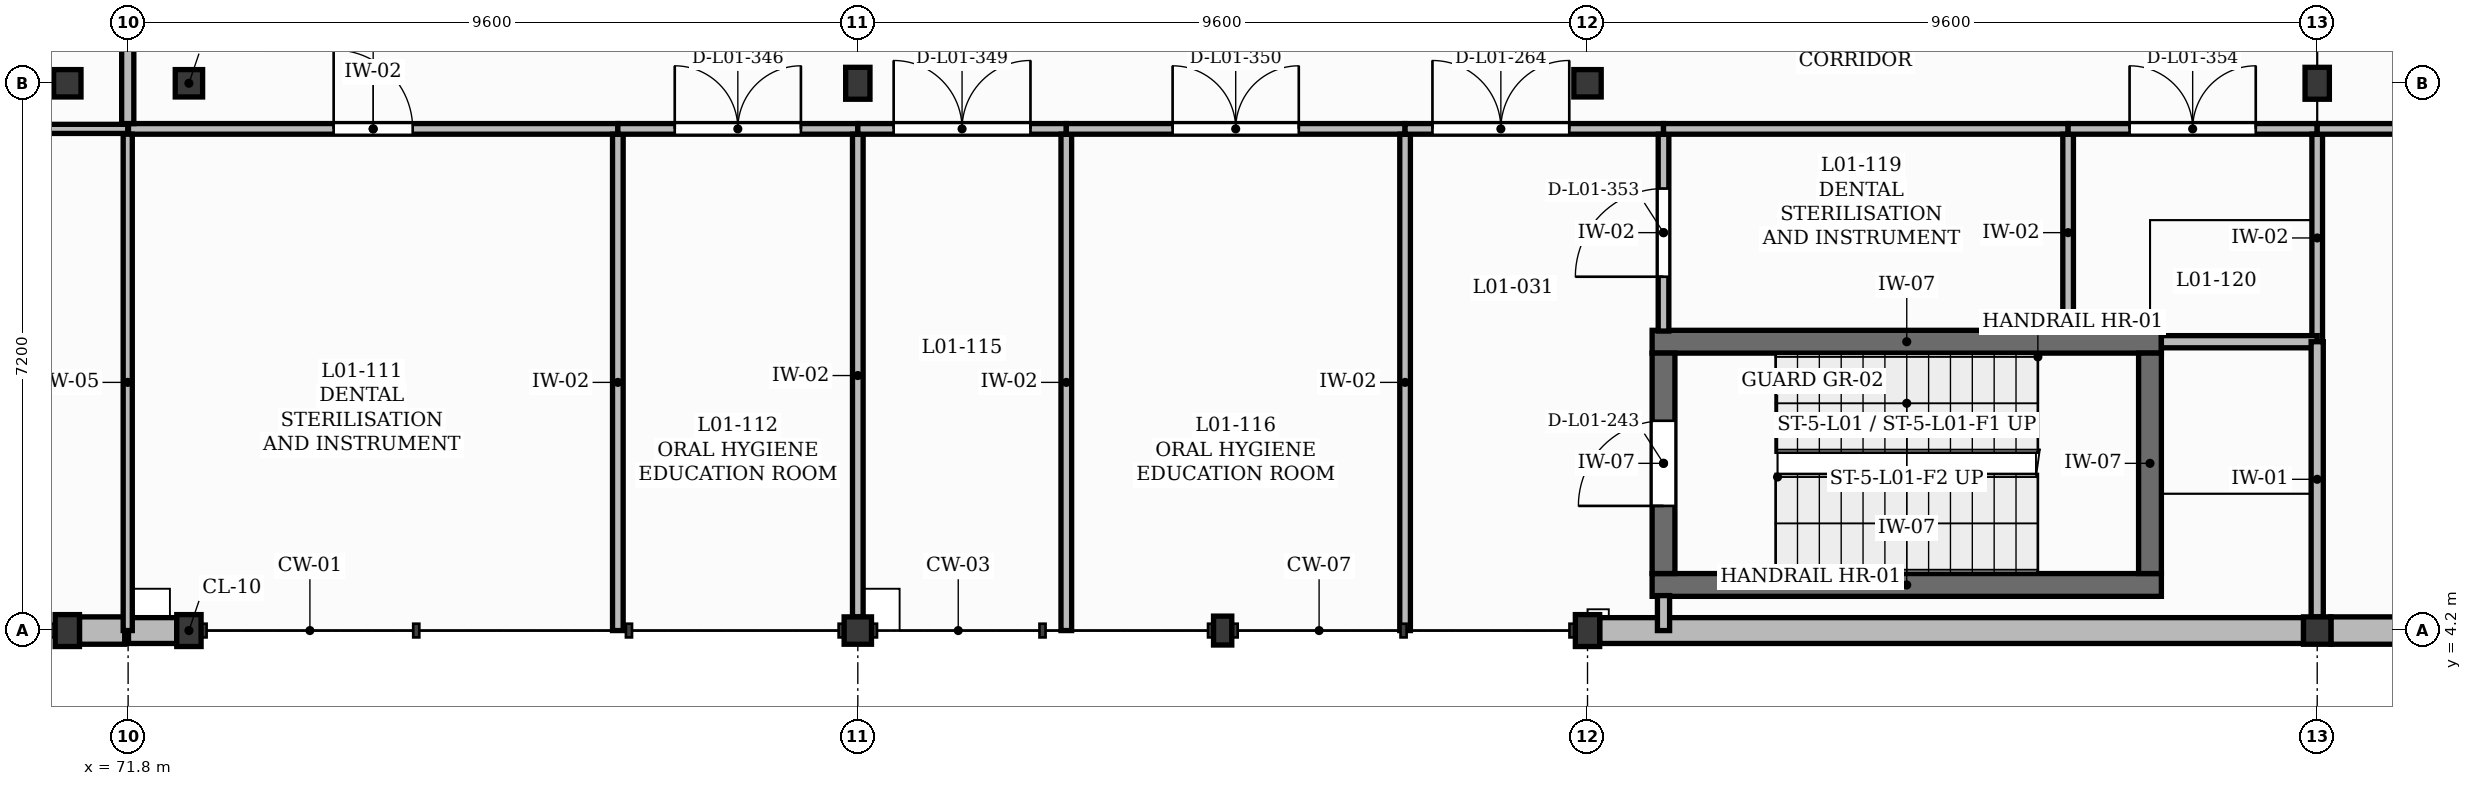
"""IFC4 building model, lengths in metres.
Left out: names, types, materials, properties, quantities, classifications, styles, units other than length and angle.
Written with IfcOpenShell. Run it as: python <this file> out.ifc"""

import sys

from ifc_helpers import new_model, si_unit, direction, frame, frame_2d, origin, origin_2d, place, context, subcontext, project, spatial, rectangle, extrude, element, fill, save


model = new_model("IFC4")
c1 = context("Model", 3, precision=1e-05, world=origin(), true_north=direction((0.0, 1.0)))
c2 = subcontext(c1, "Body", "Model", "MODEL_VIEW")
j1 = project(units=[si_unit("LENGTHUNIT", "METRE"), si_unit("PLANEANGLEUNIT", "RADIAN")], contexts=[c1])
p1 = place(None, origin())
s1 = spatial("IfcSite", under=j1, at=p1, CompositionType="ELEMENT")
p2 = place(p1, origin())
s2 = spatial("IfcBuilding", under=s1, at=p2, CompositionType="ELEMENT")
p3 = place(p2, frame((0.0, 0.0, 4.5)))
s3 = spatial("IfcBuildingStorey", under=s2, at=p3, CompositionType="ELEMENT", Elevation=4.5)
p4 = place(p3, frame((72.6, 4.2, 0.0), z_axis=(0.0, 0.0, 1.0), x_axis=(1.0, 0.0, 0.0)))
e1 = element("IfcColumn", 1, at=p4, inside=s3, PredefinedType="COLUMN", context=c2, shape_type="SweptSolid", body=[
    extrude(rectangle(XDim=0.32, YDim=0.42, at=origin_2d()), origin(), (0.0, 0.0, 1.0), 4.26),
])
for number, where, z_axis, x_axis in (
    (2, (72.6, 11.4, 0.0), (0.0, 0.0, 1.0), (1.0, 0.0, 0.0)),
    (3, (81.4, 4.2, 0.0), (0.0, 0.0, 1.0), (1.0, 0.0, 0.0)),
):
    element("IfcColumn", number, at=place(p3, frame(where, z_axis=z_axis, x_axis=x_axis)), inside=s3, PredefinedType="COLUMN", context=c2, shape_type="SweptSolid", body=[
        extrude(rectangle(XDim=0.36, YDim=0.36, at=origin_2d()), origin(), (0.0, 0.0, 1.0), 4.26),
    ])
for number, where, z_axis, x_axis in (
    (4, (81.4, 11.4, 0.0), (0.0, 0.0, 1.0), (1.0, 0.0, 0.0)),
    (5, (91.0, 4.2, 0.0), (0.0, 0.0, 1.0), (1.0, 0.0, 0.0)),
):
    element("IfcColumn", number, at=place(p3, frame(where, z_axis=z_axis, x_axis=x_axis)), inside=s3, PredefinedType="COLUMN", context=c2, shape_type="SweptSolid", body=[
        extrude(rectangle(XDim=0.32, YDim=0.42, at=origin_2d()), origin(), (0.0, 0.0, 1.0), 4.26),
    ])
for number, where, z_axis, x_axis in (
    (6, (91.0, 11.4, 0.0), (0.0, 0.0, 1.0), (1.0, 0.0, 0.0)),
    (7, (100.6, 4.2, 0.0), (0.0, 0.0, 1.0), (1.0, 0.0, 0.0)),
):
    element("IfcColumn", number, at=place(p3, frame(where, z_axis=z_axis, x_axis=x_axis)), inside=s3, PredefinedType="COLUMN", context=c2, shape_type="SweptSolid", body=[
        extrude(rectangle(XDim=0.36, YDim=0.36, at=origin_2d()), origin(), (0.0, 0.0, 1.0), 4.26),
    ])
for number, where, z_axis, x_axis in (
    (8, (100.6, 11.4, 0.0), (0.0, 0.0, 1.0), (1.0, 0.0, 0.0)),
    (9, (71.0, 4.2, 0.0), (0.0, 0.0, 1.0), (1.0, 0.0, 0.0)),
):
    element("IfcColumn", number, at=place(p3, frame(where, z_axis=z_axis, x_axis=x_axis)), inside=s3, PredefinedType="COLUMN", context=c2, shape_type="SweptSolid", body=[
        extrude(rectangle(XDim=0.32, YDim=0.42, at=origin_2d()), origin(), (0.0, 0.0, 1.0), 4.26),
    ])
p5 = place(p3, frame((71.0, 11.4, 0.0), z_axis=(0.0, 0.0, 1.0), x_axis=(1.0, 0.0, 0.0)))
e10 = element("IfcColumn", 10, at=p5, inside=s3, PredefinedType="COLUMN", context=c2, shape_type="SweptSolid", body=[
    extrude(rectangle(XDim=0.36, YDim=0.36, at=origin_2d()), origin(), (0.0, 0.0, 1.0), 4.26),
])
p6 = place(p3, frame((86.2, 4.2, 0.0), z_axis=(0.0, 0.0, 1.0), x_axis=(1.0, 0.0, 0.0)))
e11 = element("IfcColumn", 11, at=p6, inside=s3, PredefinedType="PILASTER", context=c2, shape_type="SweptSolid", body=[
    extrude(rectangle(XDim=0.24, YDim=0.38, at=origin_2d()), origin(), (0.0, 0.0, 1.0), 4.26),
])
p7 = place(p3, frame((71.16, 4.2, 0.0), z_axis=(0.0, 0.0, 1.0), x_axis=(1.0, 0.0, 0.0)))
e12 = element("IfcWall", 12, at=p7, inside=s3, PredefinedType="SOLIDWALL", context=c2, shape_type="SweptSolid", body=[
    extrude(rectangle(XDim=0.595, YDim=0.36, at=frame_2d((0.297, 0.0))), origin(), (0.0, 0.0, 1.0), 4.26),
])
p8 = place(p3, frame((71.805, 4.2, 0.0), z_axis=(0.0, 0.0, 1.0), x_axis=(1.0, 0.0, 0.0)))
e13 = element("IfcWall", 13, at=p8, inside=s3, PredefinedType="SOLIDWALL", context=c2, shape_type="SweptSolid", body=[
    extrude(rectangle(XDim=0.635, YDim=0.34, at=frame_2d((0.317, 0.0))), origin(), (0.0, 0.0, 1.0), 4.26),
])
p9 = place(p3, frame((91.16, 4.2, 0.0), z_axis=(0.0, 0.0, 1.0), x_axis=(1.0, 0.0, 0.0)))
e14 = element("IfcWall", 14, at=p9, inside=s3, PredefinedType="SOLIDWALL", context=c2, shape_type="SweptSolid", body=[
    extrude(rectangle(XDim=9.26, YDim=0.34, at=frame_2d((4.63, 0.0))), origin(), (0.0, 0.0, 1.0), 3.8),
])
p10 = place(p3, frame((100.78, 4.2, 0.0), z_axis=(0.0, 0.0, 1.0), x_axis=(1.0, 0.0, 0.0)))
e15 = element("IfcWall", 15, at=p10, inside=s3, PredefinedType="SOLIDWALL", context=c2, shape_type="SweptSolid", body=[
    extrude(rectangle(XDim=3.3, YDim=0.36, at=frame_2d((1.65, 0.0))), origin(), (0.0, 0.0, 1.0), 3.8),
])
p11 = place(p10, frame((0.99, 0.0, 1.5)))
e16 = element("IfcOpeningElement", 16, at=p11, cuts=e15, PredefinedType="OPENING", context=c2, shape_type="SweptSolid", body=[
    extrude(rectangle(XDim=1.32, YDim=1.25, at=frame_2d((0.66, 0.625))), frame((0.0, 0.19, 0.0), z_axis=(0.0, -1.0, 0.0), x_axis=(1.0, 0.0, 0.0)), (0.0, 0.0, 1.0), 0.38),
])
for number, where, z_axis, x_axis in (
    (17, (91.85, 4.8, 0.0), (0.0, 0.0, 1.0), (1.0, 0.0, 0.0)),
    (18, (91.85, 8.0, 0.0), (0.0, 0.0, 1.0), (1.0, 0.0, 0.0)),
):
    element("IfcWall", number, at=place(p3, frame(where, z_axis=z_axis, x_axis=x_axis)), inside=s3, PredefinedType="SHEAR", context=c2, shape_type="SweptSolid", body=[
        extrude(rectangle(XDim=6.7, YDim=0.3, at=frame_2d((3.35, 0.0))), origin(), (0.0, 0.0, 1.0), 4.25),
    ])
p12 = place(p3, frame((92.0, 4.95, 0.0), z_axis=(0.0, 0.0, 1.0), x_axis=(0.0, 1.0, 0.0)))
e19 = element("IfcWall", 19, at=p12, inside=s3, PredefinedType="SHEAR", context=c2, shape_type="SweptSolid", body=[
    extrude(rectangle(XDim=2.9, YDim=0.3, at=frame_2d((1.45, 0.0))), origin(), (0.0, 0.0, 1.0), 4.25),
])
p13 = place(p12, frame((0.89, 0.0, 0.0)))
e20 = element("IfcOpeningElement", 20, at=p13, cuts=e19, PredefinedType="OPENING", context=c2, shape_type="SweptSolid", body=[
    extrude(rectangle(XDim=1.12, YDim=2.1, at=frame_2d((0.56, 1.05))), frame((0.0, 0.16, 0.0), z_axis=(0.0, -1.0, 0.0), x_axis=(1.0, 0.0, 0.0)), (0.0, 0.0, 1.0), 0.32),
])
p14 = place(p3, frame((98.4, 4.95, 0.0), z_axis=(0.0, 0.0, 1.0), x_axis=(0.0, 1.0, 0.0)))
e21 = element("IfcWall", 21, at=p14, inside=s3, PredefinedType="SHEAR", context=c2, shape_type="SweptSolid", body=[
    extrude(rectangle(XDim=2.9, YDim=0.3, at=frame_2d((1.45, 0.0))), origin(), (0.0, 0.0, 1.0), 4.25),
])
p15 = place(p3, frame((65.8, 10.8, 0.0), z_axis=(0.0, 0.0, 1.0), x_axis=(1.0, 0.0, 0.0)))
e22 = element("IfcWall", 22, at=p15, inside=s3, PredefinedType="PLUMBINGWALL", context=c2, shape_type="SweptSolid", body=[
    extrude(rectangle(XDim=5.995, YDim=0.12, at=frame_2d((2.998, 0.0))), origin(), (0.0, 0.0, 1.0), 4.18),
])
p16 = place(p15, frame((2.522, 0.0, 0.0)))
e23 = element("IfcOpeningElement", 23, at=p16, cuts=e22, PredefinedType="OPENING", context=c2, shape_type="SweptSolid", body=[
    extrude(rectangle(XDim=0.95, YDim=2.1, at=frame_2d((0.475, 1.05))), frame((0.0, 0.07, 0.0), z_axis=(0.0, -1.0, 0.0), x_axis=(1.0, 0.0, 0.0)), (0.0, 0.0, 1.0), 0.14),
])
p17 = place(p3, frame((71.805, 10.8, 0.0), z_axis=(0.0, 0.0, 1.0), x_axis=(1.0, 0.0, 0.0)))
e24 = element("IfcWall", 24, at=p17, inside=s3, PredefinedType="PARTITIONING", context=c2, shape_type="SweptSolid", body=[
    extrude(rectangle(XDim=6.438, YDim=0.14, at=frame_2d((3.219, 0.0))), origin(), (0.0, 0.0, 1.0), 4.18),
])
p18 = place(p17, frame((2.699, 0.0, 0.0)))
e25 = element("IfcOpeningElement", 25, at=p18, cuts=e24, PredefinedType="OPENING", context=c2, shape_type="SweptSolid", body=[
    extrude(rectangle(XDim=1.04, YDim=2.1, at=frame_2d((0.52, 1.05))), frame((0.0, 0.08, 0.0), z_axis=(0.0, -1.0, 0.0), x_axis=(1.0, 0.0, 0.0)), (0.0, 0.0, 1.0), 0.16),
])
p19 = place(p3, frame((78.243, 4.2, 0.0), z_axis=(0.0, 0.0, 1.0), x_axis=(0.0, 1.0, 0.0)))
e26 = element("IfcWall", 26, at=p19, inside=s3, PredefinedType="PARTITIONING", context=c2, shape_type="SweptSolid", body=[
    extrude(rectangle(XDim=6.53, YDim=0.14, at=frame_2d((3.265, 0.0))), origin(), (0.0, 0.0, 1.0), 4.18),
])
p20 = place(p3, frame((78.243, 10.8, 0.0), z_axis=(0.0, 0.0, 1.0), x_axis=(1.0, 0.0, 0.0)))
e27 = element("IfcWall", 27, at=p20, inside=s3, PredefinedType="PARTITIONING", context=c2, shape_type="SweptSolid", body=[
    extrude(rectangle(XDim=3.157, YDim=0.14, at=frame_2d((1.579, 0.0))), origin(), (0.0, 0.0, 1.0), 4.18),
])
p21 = place(p20, frame((0.749, 0.0, 0.0)))
e28 = element("IfcOpeningElement", 28, at=p21, cuts=e27, PredefinedType="OPENING", context=c2, shape_type="SweptSolid", body=[
    extrude(rectangle(XDim=1.66, YDim=2.3, at=frame_2d((0.83, 1.15))), frame((0.0, 0.08, 0.0), z_axis=(0.0, -1.0, 0.0), x_axis=(1.0, 0.0, 0.0)), (0.0, 0.0, 1.0), 0.16),
])
p22 = place(p3, frame((81.4, 4.38, 0.0), z_axis=(0.0, 0.0, 1.0), x_axis=(0.0, 1.0, 0.0)))
e29 = element("IfcWall", 29, at=p22, inside=s3, PredefinedType="PARTITIONING", context=c2, shape_type="SweptSolid", body=[
    extrude(rectangle(XDim=6.35, YDim=0.14, at=frame_2d((3.175, 0.0))), origin(), (0.0, 0.0, 1.0), 3.74),
])
p23 = place(p3, frame((81.4, 10.8, 0.0), z_axis=(0.0, 0.0, 1.0), x_axis=(1.0, 0.0, 0.0)))
e30 = element("IfcWall", 30, at=p23, inside=s3, PredefinedType="PARTITIONING", context=c2, shape_type="SweptSolid", body=[
    extrude(rectangle(XDim=2.743, YDim=0.14, at=frame_2d((1.372, 0.0))), origin(), (0.0, 0.0, 1.0), 4.18),
])
p24 = place(p23, frame((0.471, 0.0, 0.0)))
e31 = element("IfcOpeningElement", 31, at=p24, cuts=e30, PredefinedType="OPENING", context=c2, shape_type="SweptSolid", body=[
    extrude(rectangle(XDim=1.8, YDim=2.3, at=frame_2d((0.9, 1.15))), frame((0.0, 0.08, 0.0), z_axis=(0.0, -1.0, 0.0), x_axis=(1.0, 0.0, 0.0)), (0.0, 0.0, 1.0), 0.16),
])
p25 = place(p3, frame((84.143, 4.2, 0.0), z_axis=(0.0, 0.0, 1.0), x_axis=(0.0, 1.0, 0.0)))
e32 = element("IfcWall", 32, at=p25, inside=s3, PredefinedType="PARTITIONING", context=c2, shape_type="SweptSolid", body=[
    extrude(rectangle(XDim=6.53, YDim=0.14, at=frame_2d((3.265, 0.0))), origin(), (0.0, 0.0, 1.0), 4.18),
])
p26 = place(p3, frame((84.143, 10.8, 0.0), z_axis=(0.0, 0.0, 1.0), x_axis=(1.0, 0.0, 0.0)))
e33 = element("IfcWall", 33, at=p26, inside=s3, PredefinedType="PARTITIONING", context=c2, shape_type="SweptSolid", body=[
    extrude(rectangle(XDim=4.457, YDim=0.14, at=frame_2d((2.229, 0.0))), origin(), (0.0, 0.0, 1.0), 4.18),
])
p27 = place(p26, frame((1.398, 0.0, 0.0)))
e34 = element("IfcOpeningElement", 34, at=p27, cuts=e33, PredefinedType="OPENING", context=c2, shape_type="SweptSolid", body=[
    extrude(rectangle(XDim=1.66, YDim=2.3, at=frame_2d((0.83, 1.15))), frame((0.0, 0.08, 0.0), z_axis=(0.0, -1.0, 0.0), x_axis=(1.0, 0.0, 0.0)), (0.0, 0.0, 1.0), 0.16),
])
p28 = place(p3, frame((88.6, 4.2, 0.0), z_axis=(0.0, 0.0, 1.0), x_axis=(0.0, 1.0, 0.0)))
e35 = element("IfcWall", 35, at=p28, inside=s3, PredefinedType="PARTITIONING", context=c2, shape_type="SweptSolid", body=[
    extrude(rectangle(XDim=6.53, YDim=0.14, at=frame_2d((3.265, 0.0))), origin(), (0.0, 0.0, 1.0), 3.9),
])
p29 = place(p3, frame((88.6, 10.8, 0.0), z_axis=(0.0, 0.0, 1.0), x_axis=(1.0, 0.0, 0.0)))
e36 = element("IfcWall", 36, at=p29, inside=s3, PredefinedType="PARTITIONING", context=c2, shape_type="SweptSolid", body=[
    extrude(rectangle(XDim=3.4, YDim=0.14, at=frame_2d((1.7, 0.0))), origin(), (0.0, 0.0, 1.0), 4.18),
])
p30 = place(p29, frame((0.36, 0.0, 0.0)))
e37 = element("IfcOpeningElement", 37, at=p30, cuts=e36, PredefinedType="OPENING", context=c2, shape_type="SweptSolid", body=[
    extrude(rectangle(XDim=1.8, YDim=2.3, at=frame_2d((0.9, 1.15))), frame((0.0, 0.08, 0.0), z_axis=(0.0, -1.0, 0.0), x_axis=(1.0, 0.0, 0.0)), (0.0, 0.0, 1.0), 0.16),
])
p31 = place(p3, frame((92.0, 8.14, 0.0), z_axis=(0.0, 0.0, 1.0), x_axis=(0.0, 1.0, 0.0)))
e38 = element("IfcWall", 38, at=p31, inside=s3, PredefinedType="PARTITIONING", context=c2, shape_type="SweptSolid", body=[
    extrude(rectangle(XDim=2.59, YDim=0.14, at=frame_2d((1.295, 0.0))), origin(), (0.0, 0.0, 1.0), 4.18),
])
p32 = place(p31, frame((0.715, 0.0, 0.0)))
e39 = element("IfcOpeningElement", 39, at=p32, cuts=e38, PredefinedType="OPENING", context=c2, shape_type="SweptSolid", body=[
    extrude(rectangle(XDim=1.16, YDim=2.1, at=frame_2d((0.58, 1.05))), frame((0.0, 0.08, 0.0), z_axis=(0.0, -1.0, 0.0), x_axis=(1.0, 0.0, 0.0)), (0.0, 0.0, 1.0), 0.16),
])
p33 = place(p3, frame((92.0, 10.8, 0.0), z_axis=(0.0, 0.0, 1.0), x_axis=(1.0, 0.0, 0.0)))
e40 = element("IfcWall", 40, at=p33, inside=s3, PredefinedType="PARTITIONING", context=c2, shape_type="SweptSolid", body=[
    extrude(rectangle(XDim=5.323, YDim=0.14, at=frame_2d((2.662, 0.0))), origin(), (0.0, 0.0, 1.0), 4.18),
])
p34 = place(p3, frame((97.323, 8.14, 0.0), z_axis=(0.0, 0.0, 1.0), x_axis=(0.0, 1.0, 0.0)))
e41 = element("IfcWall", 41, at=p34, inside=s3, PredefinedType="PARTITIONING", context=c2, shape_type="SweptSolid", body=[
    extrude(rectangle(XDim=2.59, YDim=0.14, at=frame_2d((1.295, 0.0))), origin(), (0.0, 0.0, 1.0), 4.18),
])
p35 = place(p3, frame((97.323, 10.8, 0.0), z_axis=(0.0, 0.0, 1.0), x_axis=(1.0, 0.0, 0.0)))
e42 = element("IfcWall", 42, at=p35, inside=s3, PredefinedType="PARTITIONING", context=c2, shape_type="SweptSolid", body=[
    extrude(rectangle(XDim=3.277, YDim=0.14, at=frame_2d((1.639, 0.0))), origin(), (0.0, 0.0, 1.0), 4.18),
])
p36 = place(p35, frame((0.809, 0.0, 0.0)))
e43 = element("IfcOpeningElement", 43, at=p36, cuts=e42, PredefinedType="OPENING", context=c2, shape_type="SweptSolid", body=[
    extrude(rectangle(XDim=1.66, YDim=2.3, at=frame_2d((0.83, 1.15))), frame((0.0, 0.08, 0.0), z_axis=(0.0, -1.0, 0.0), x_axis=(1.0, 0.0, 0.0)), (0.0, 0.0, 1.0), 0.16),
])
p37 = place(p3, frame((100.6, 8.0, 0.0), z_axis=(0.0, 0.0, 1.0), x_axis=(0.0, 1.0, 0.0)))
e44 = element("IfcWall", 44, at=p37, inside=s3, PredefinedType="PARTITIONING", context=c2, shape_type="SweptSolid", body=[
    extrude(rectangle(XDim=2.73, YDim=0.14, at=frame_2d((1.365, 0.0))), origin(), (0.0, 0.0, 1.0), 3.74),
])
p38 = place(p3, frame((100.6, 10.8, 0.0), z_axis=(0.0, 0.0, 1.0), x_axis=(1.0, 0.0, 0.0)))
e45 = element("IfcWall", 45, at=p38, inside=s3, PredefinedType="PARTITIONING", context=c2, shape_type="SweptSolid", body=[
    extrude(rectangle(XDim=7.2, YDim=0.14, at=frame_2d((3.6, 0.0))), origin(), (0.0, 0.0, 1.0), 4.18),
])
p39 = place(p38, frame((3.14, 0.0, 0.0)))
e46 = element("IfcOpeningElement", 46, at=p39, cuts=e45, PredefinedType="OPENING", context=c2, shape_type="SweptSolid", body=[
    extrude(rectangle(XDim=0.92, YDim=2.1, at=frame_2d((0.46, 1.05))), frame((0.0, 0.08, 0.0), z_axis=(0.0, -1.0, 0.0), x_axis=(1.0, 0.0, 0.0)), (0.0, 0.0, 1.0), 0.16),
])
p40 = place(p3, frame((71.795, 10.87, 0.0), z_axis=(0.0, 0.0, 1.0), x_axis=(0.0, 1.0, 0.0)))
e47 = element("IfcWall", 47, at=p40, inside=s3, PredefinedType="PARTITIONING", context=c2, shape_type="SweptSolid", body=[
    extrude(rectangle(XDim=2.46, YDim=0.16, at=frame_2d((1.23, 0.0))), origin(), (0.0, 0.0, 1.0), 4.18),
])
p41 = place(p3, frame((92.0, 4.2, 0.0), z_axis=(0.0, 0.0, 1.0), x_axis=(0.0, 1.0, 0.0)))
e48 = element("IfcWall", 48, at=p41, inside=s3, PredefinedType="PARTITIONING", context=c2, shape_type="SweptSolid", body=[
    extrude(rectangle(XDim=0.46, YDim=0.16, at=frame_2d((0.23, 0.0))), origin(), (0.0, 0.0, 1.0), 4.18),
])
p42 = place(p3, frame((71.795, 4.2, 0.0), z_axis=(0.0, 0.0, 1.0), x_axis=(0.0, 1.0, 0.0)))
e49 = element("IfcWall", 49, at=p42, inside=s3, PredefinedType="PLUMBINGWALL", context=c2, shape_type="SweptSolid", body=[
    extrude(rectangle(XDim=6.53, YDim=0.12, at=frame_2d((3.265, 0.0))), origin(), (0.0, 0.0, 1.0), 4.18),
])
p43 = place(p3, frame((98.55, 8.0, 0.0), z_axis=(0.0, 0.0, 1.0), x_axis=(1.0, 0.0, 0.0)))
e50 = element("IfcWall", 50, at=p43, inside=s3, PredefinedType="PARTITIONING", context=c2, shape_type="SweptSolid", body=[
    extrude(rectangle(XDim=2.05, YDim=0.16, at=frame_2d((1.025, 0.0))), origin(), (0.0, 0.0, 1.0), 4.18),
])
p44 = place(p3, frame((100.6, 4.38, 0.0), z_axis=(0.0, 0.0, 1.0), x_axis=(0.0, 1.0, 0.0)))
e51 = element("IfcWall", 51, at=p44, inside=s3, PredefinedType="PARTITIONING", context=c2, shape_type="SweptSolid", body=[
    extrude(rectangle(XDim=3.62, YDim=0.16, at=frame_2d((1.81, 0.0))), origin(), (0.0, 0.0, 1.0), 3.74),
])
p45 = place(p13, origin())
e52 = element("IfcDoor", 52, at=p45, inside=s3, OperationType="SINGLE_SWING_LEFT", PredefinedType="DOOR", context=c2, shape_type="SweptSolid", body=[
    extrude(rectangle(XDim=1.12, YDim=2.1, at=frame_2d((0.56, 1.05))), frame((0.0, 0.025, 0.0), z_axis=(0.0, -1.0, 0.0), x_axis=(1.0, 0.0, 0.0)), (0.0, 0.0, 1.0), 0.05),
])
fill(e20, e52)
p46 = place(p30, origin())
e53 = element("IfcDoor", 53, at=p46, inside=s3, OperationType="DOUBLE_DOOR_SINGLE_SWING", PredefinedType="DOOR", context=c2, shape_type="SweptSolid", body=[
    extrude(rectangle(XDim=1.8, YDim=2.3, at=frame_2d((0.9, 1.15))), frame((0.0, 0.025, 0.0), z_axis=(0.0, -1.0, 0.0), x_axis=(1.0, 0.0, 0.0)), (0.0, 0.0, 1.0), 0.05),
])
fill(e37, e53)
p47 = place(p18, origin())
e54 = element("IfcDoor", 54, at=p47, inside=s3, OperationType="SINGLE_SWING_LEFT", PredefinedType="DOOR", context=c2, shape_type="SweptSolid", body=[
    extrude(rectangle(XDim=1.04, YDim=2.1, at=frame_2d((0.52, 1.05))), frame((0.0, 0.025, 0.0), z_axis=(0.0, -1.0, 0.0), x_axis=(1.0, 0.0, 0.0)), (0.0, 0.0, 1.0), 0.05),
])
fill(e25, e54)
p48 = place(p21, origin())
e55 = element("IfcDoor", 55, at=p48, inside=s3, OperationType="DOUBLE_DOOR_SINGLE_SWING", PredefinedType="DOOR", context=c2, shape_type="SweptSolid", body=[
    extrude(rectangle(XDim=1.66, YDim=2.3, at=frame_2d((0.83, 1.15))), frame((0.0, 0.025, 0.0), z_axis=(0.0, -1.0, 0.0), x_axis=(1.0, 0.0, 0.0)), (0.0, 0.0, 1.0), 0.05),
])
fill(e28, e55)
p49 = place(p24, origin())
e56 = element("IfcDoor", 56, at=p49, inside=s3, OperationType="DOUBLE_DOOR_SINGLE_SWING", PredefinedType="DOOR", context=c2, shape_type="SweptSolid", body=[
    extrude(rectangle(XDim=1.8, YDim=2.3, at=frame_2d((0.9, 1.15))), frame((0.0, 0.025, 0.0), z_axis=(0.0, -1.0, 0.0), x_axis=(1.0, 0.0, 0.0)), (0.0, 0.0, 1.0), 0.05),
])
fill(e31, e56)
p50 = place(p27, origin())
e57 = element("IfcDoor", 57, at=p50, inside=s3, OperationType="DOUBLE_DOOR_SINGLE_SWING", PredefinedType="DOOR", context=c2, shape_type="SweptSolid", body=[
    extrude(rectangle(XDim=1.66, YDim=2.3, at=frame_2d((0.83, 1.15))), frame((0.0, 0.025, 0.0), z_axis=(0.0, -1.0, 0.0), x_axis=(1.0, 0.0, 0.0)), (0.0, 0.0, 1.0), 0.05),
])
fill(e34, e57)
p51 = place(p32, origin())
e58 = element("IfcDoor", 58, at=p51, inside=s3, OperationType="SINGLE_SWING_LEFT", PredefinedType="DOOR", context=c2, shape_type="SweptSolid", body=[
    extrude(rectangle(XDim=1.16, YDim=2.1, at=frame_2d((0.58, 1.05))), frame((0.0, 0.025, 0.0), z_axis=(0.0, -1.0, 0.0), x_axis=(1.0, 0.0, 0.0)), (0.0, 0.0, 1.0), 0.05),
])
fill(e39, e58)
p52 = place(p36, origin())
e59 = element("IfcDoor", 59, at=p52, inside=s3, OperationType="DOUBLE_DOOR_SINGLE_SWING", PredefinedType="DOOR", context=c2, shape_type="SweptSolid", body=[
    extrude(rectangle(XDim=1.66, YDim=2.3, at=frame_2d((0.83, 1.15))), frame((0.0, 0.025, 0.0), z_axis=(0.0, -1.0, 0.0), x_axis=(1.0, 0.0, 0.0)), (0.0, 0.0, 1.0), 0.05),
])
fill(e43, e59)
save(model, sys.argv[1])
